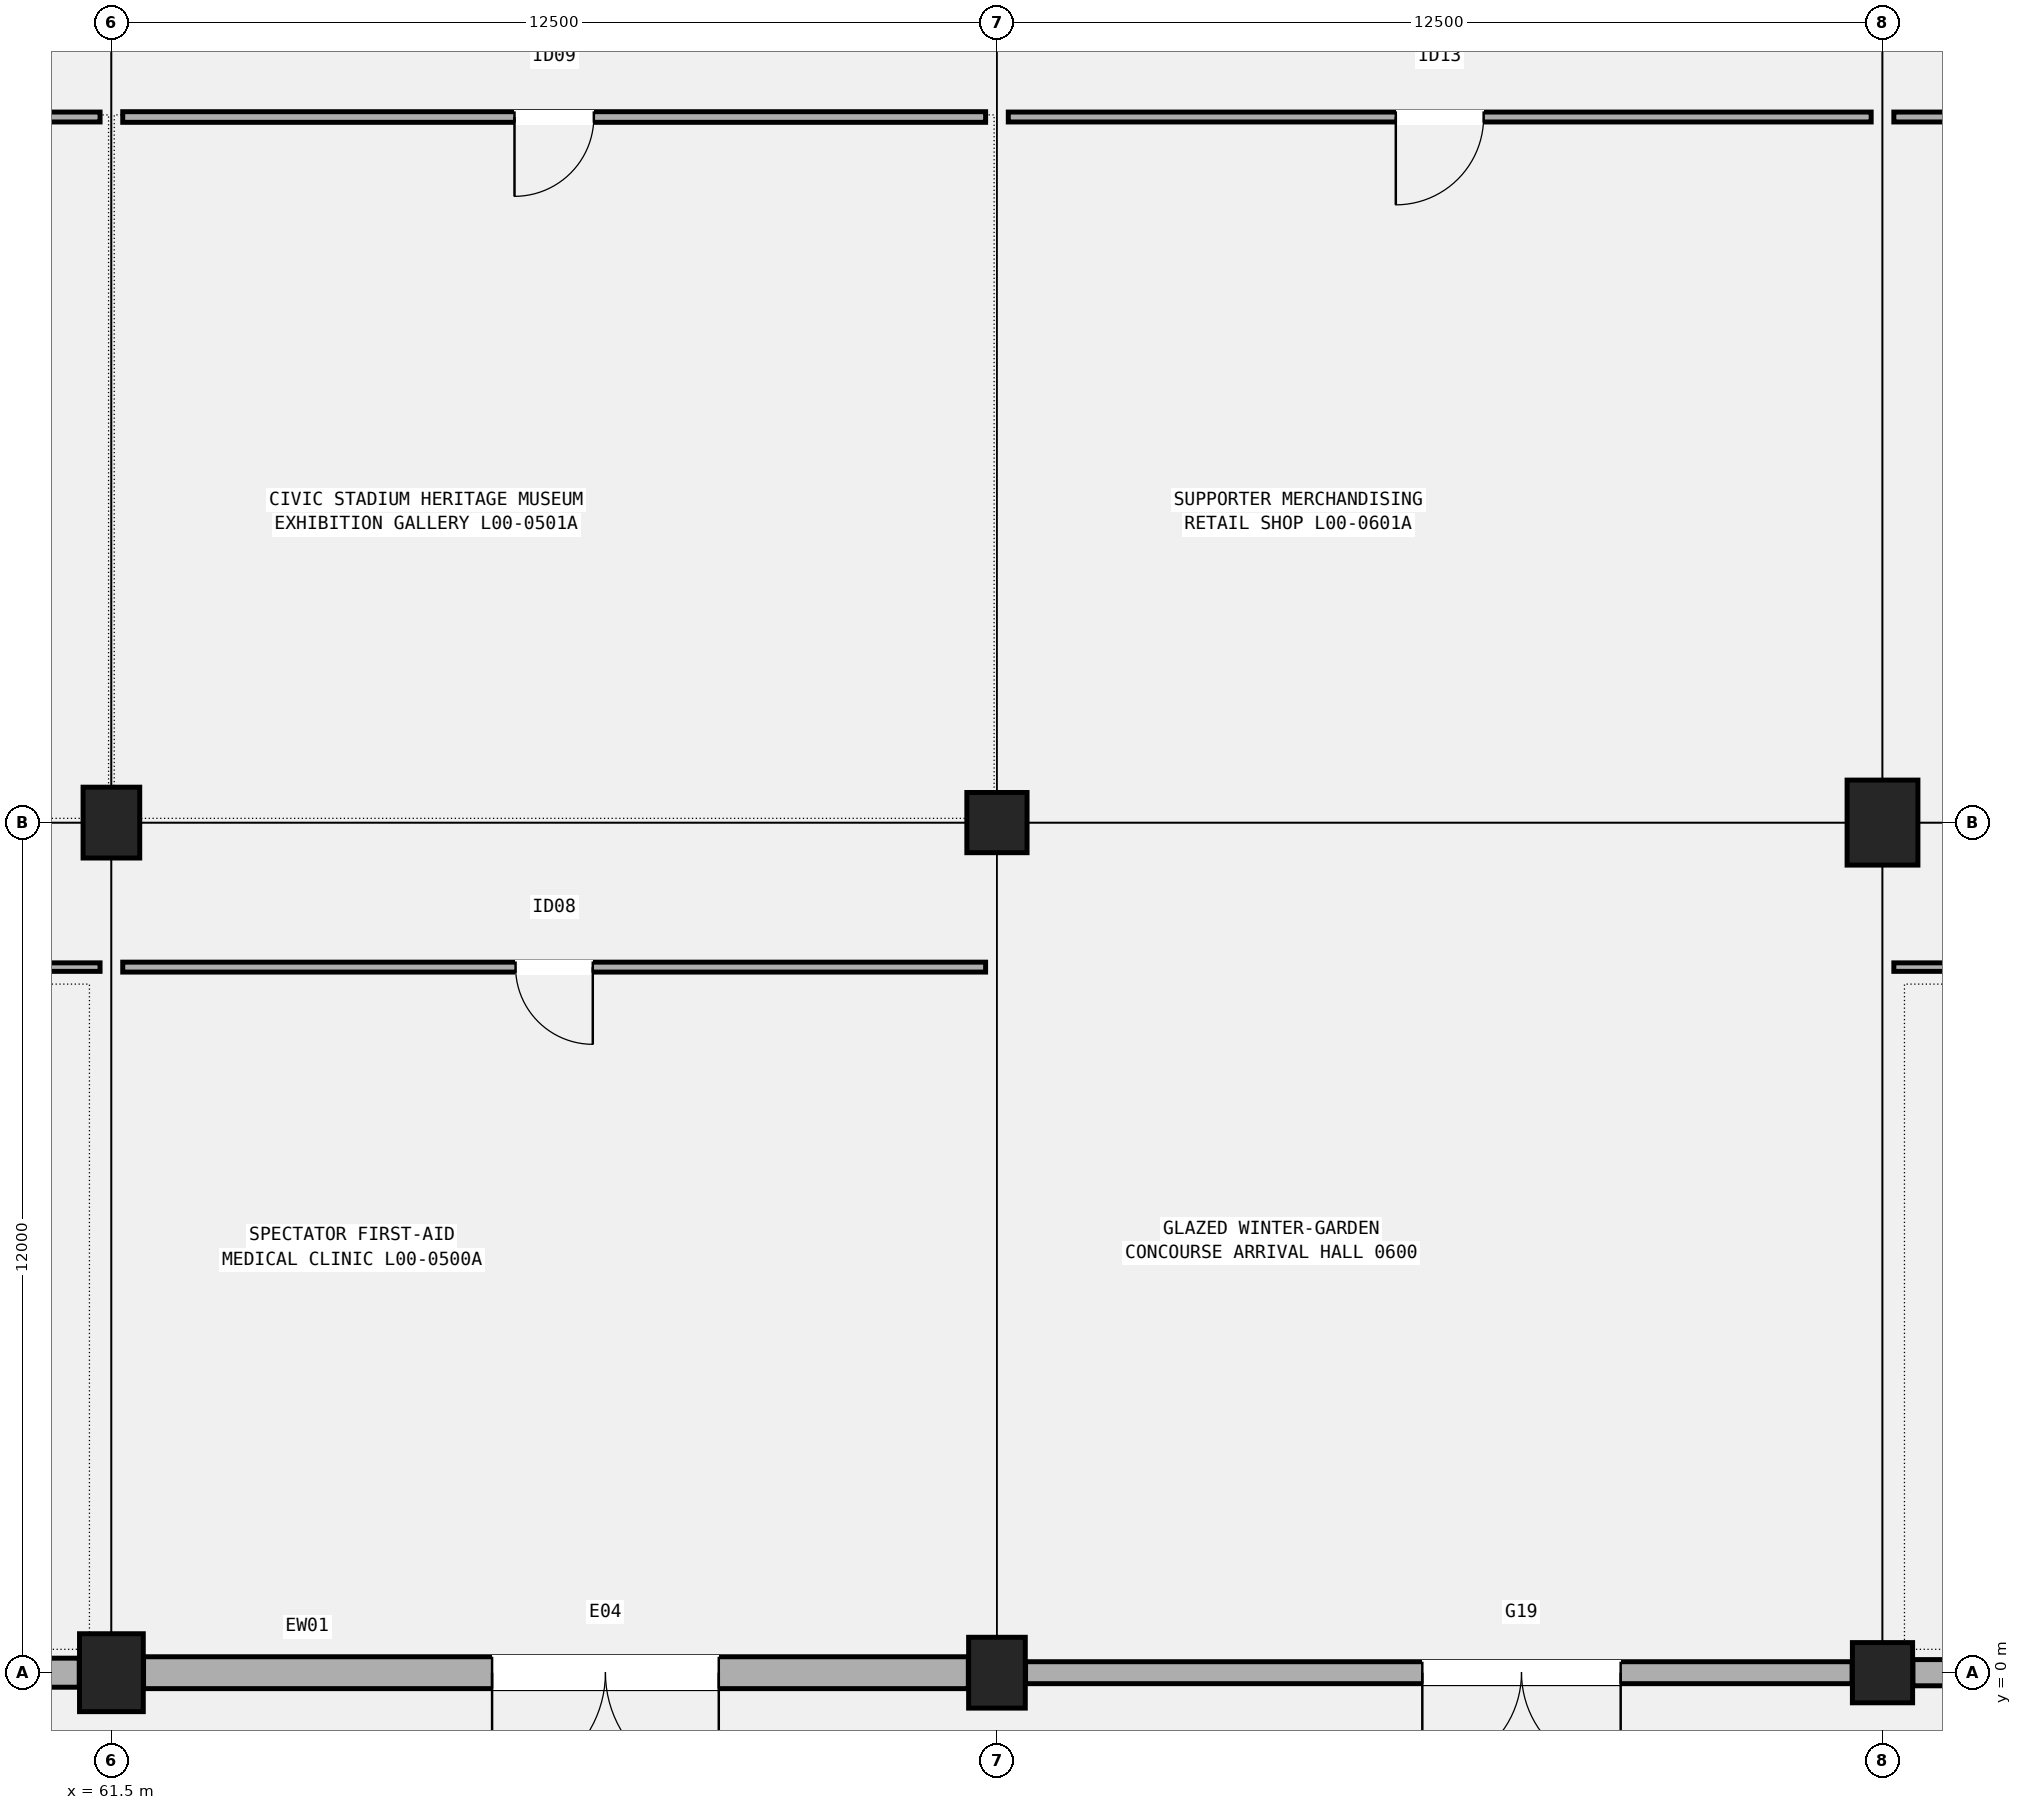
"""IFC4 building model, lengths in metres.
Left out: names, types, materials, properties, quantities, classifications, styles, units other than length and angle.
Written with IfcOpenShell. Run it as: python <this file> out.ifc"""

import sys

from ifc_helpers import new_model, si_unit, direction, frame, frame_2d, origin, origin_2d, place, context, subcontext, project, spatial, rectangle, circle, extrude, element, fill, save


model = new_model("IFC4")
c1 = context("Model", 3, precision=1e-05, world=origin(), true_north=direction((0.0, 1.0)))
c2 = subcontext(c1, "Body", "Model", "MODEL_VIEW")
j1 = project(units=[si_unit("LENGTHUNIT", "METRE"), si_unit("PLANEANGLEUNIT", "RADIAN")], contexts=[c1])
p1 = place(None, origin())
s1 = spatial("IfcSite", under=j1, at=p1, CompositionType="ELEMENT")
p2 = place(p1, origin())
s2 = spatial("IfcBuilding", under=s1, at=p2, CompositionType="ELEMENT")
p3 = place(p2, origin())
s3 = spatial("IfcBuildingStorey", under=s2, at=p3, CompositionType="ELEMENT", Elevation=0.0)
p4 = place(p3, frame((61.5, 0.0, 0.0), z_axis=(0.0, 0.0, 1.0), x_axis=(1.0, 0.0, 0.0)))
e1 = element("IfcColumn", 1, at=p4, inside=s3, PredefinedType="COLUMN", context=c2, shape_type="SweptSolid", body=[
    extrude(rectangle(XDim=0.9, YDim=1.1, at=origin_2d()), origin(), (0.0, 0.0, 1.0), 5.4),
])
for number, where, z_axis, x_axis in (
    (2, (61.5, 12.0, 0.0), (0.0, 0.0, 1.0), (1.0, 0.0, 0.0)),
    (3, (74.0, 0.0, 0.0), (0.0, 0.0, 1.0), (1.0, 0.0, 0.0)),
):
    element("IfcColumn", number, at=place(p3, frame(where, z_axis=z_axis, x_axis=x_axis)), inside=s3, PredefinedType="COLUMN", context=c2, shape_type="SweptSolid", body=[
        extrude(rectangle(XDim=0.8, YDim=1.0, at=origin_2d()), origin(), (0.0, 0.0, 1.0), 5.4),
    ])
for number, where, z_axis, x_axis in (
    (4, (74.0, 12.0, 0.0), (0.0, 0.0, 1.0), (1.0, 0.0, 0.0)),
    (5, (86.5, 0.0, 0.0), (0.0, 0.0, 1.0), (1.0, 0.0, 0.0)),
):
    element("IfcColumn", number, at=place(p3, frame(where, z_axis=z_axis, x_axis=x_axis)), inside=s3, PredefinedType="COLUMN", context=c2, shape_type="SweptSolid", body=[
        extrude(circle(Radius=0.425, at=origin_2d()), origin(), (0.0, 0.0, 1.0), 5.4),
    ])
p5 = place(p3, frame((86.5, 12.0, 0.0), z_axis=(0.0, 0.0, 1.0), x_axis=(1.0, 0.0, 0.0)))
e6 = element("IfcColumn", 6, at=p5, inside=s3, PredefinedType="COLUMN", context=c2, shape_type="SweptSolid", body=[
    extrude(rectangle(XDim=1.0, YDim=1.2, at=origin_2d()), origin(), (0.0, 0.0, 1.0), 5.4),
])
p6 = place(p3, frame((49.504, 0.0, 0.0), z_axis=(0.0, 0.0, 1.0), x_axis=(1.0, 0.0, 0.0)))
e7 = element("IfcWall", 7, at=p6, inside=s3, PredefinedType="SOLIDWALL", context=c2, shape_type="SweptSolid", body=[
    extrude(rectangle(XDim=11.542, YDim=0.41, at=frame_2d((5.771, 0.0))), origin(), (0.0, 0.0, 1.0), 4.09),
])
p7 = place(p6, frame((8.325, 0.0, 0.0), z_axis=(0.0, 0.0, 1.0), x_axis=(-1.0, 0.0, 0.0)))
e8 = element("IfcOpeningElement", 8, at=p7, cuts=e7, PredefinedType="OPENING", context=c2, shape_type="SweptSolid", body=[
    extrude(rectangle(XDim=2.8, YDim=2.4, at=frame_2d((1.4, 1.2))), frame((0.0, 0.215, 0.0), z_axis=(0.0, -1.0, 0.0), x_axis=(1.0, 0.0, 0.0)), (0.0, 0.0, 1.0), 0.43),
])
p8 = place(p3, frame((61.954, 0.0, 0.0), z_axis=(0.0, 0.0, 1.0), x_axis=(1.0, 0.0, 0.0)))
e9 = element("IfcWall", 9, at=p8, inside=s3, PredefinedType="SOLIDWALL", context=c2, shape_type="SweptSolid", body=[
    extrude(rectangle(XDim=11.642, YDim=0.45, at=frame_2d((5.821, 0.0))), origin(), (0.0, 0.0, 1.0), 4.24),
])
p9 = place(p8, frame((8.119, 0.0, 0.0), z_axis=(0.0, 0.0, 1.0), x_axis=(-1.0, 0.0, 0.0)))
e10 = element("IfcOpeningElement", 10, at=p9, cuts=e9, PredefinedType="OPENING", context=c2, shape_type="SweptSolid", body=[
    extrude(rectangle(XDim=3.2, YDim=2.6, at=frame_2d((1.6, 1.3))), frame((0.0, 0.235, 0.0), z_axis=(0.0, -1.0, 0.0), x_axis=(1.0, 0.0, 0.0)), (0.0, 0.0, 1.0), 0.47),
])
p10 = place(p3, frame((74.404, 0.0, 0.0), z_axis=(0.0, 0.0, 1.0), x_axis=(1.0, 0.0, 0.0)))
e11 = element("IfcWall", 11, at=p10, inside=s3, PredefinedType="SOLIDWALL", context=c2, shape_type="SweptSolid", body=[
    extrude(rectangle(XDim=11.667, YDim=0.31, at=frame_2d((5.833, 0.0))), origin(), (0.0, 0.0, 1.0), 4.24),
])
p11 = place(p10, frame((8.4, 0.0, 0.0), z_axis=(0.0, 0.0, 1.0), x_axis=(-1.0, 0.0, 0.0)))
e12 = element("IfcOpeningElement", 12, at=p11, cuts=e11, PredefinedType="OPENING", context=c2, shape_type="SweptSolid", body=[
    extrude(rectangle(XDim=2.8, YDim=2.4, at=frame_2d((1.4, 1.2))), frame((0.0, 0.165, 0.0), z_axis=(0.0, -1.0, 0.0), x_axis=(1.0, 0.0, 0.0)), (0.0, 0.0, 1.0), 0.33),
])
p12 = place(p3, frame((86.929, 0.0, 0.0), z_axis=(0.0, 0.0, 1.0), x_axis=(1.0, 0.0, 0.0)))
e13 = element("IfcWall", 13, at=p12, inside=s3, PredefinedType="SOLIDWALL", context=c2, shape_type="SweptSolid", body=[
    extrude(rectangle(XDim=11.567, YDim=0.37, at=frame_2d((5.784, 0.0))), origin(), (0.0, 0.0, 1.0), 4.34),
])
p13 = place(p12, frame((8.34, 0.0, 0.0), z_axis=(0.0, 0.0, 1.0), x_axis=(-1.0, 0.0, 0.0)))
e14 = element("IfcOpeningElement", 14, at=p13, cuts=e13, PredefinedType="OPENING", context=c2, shape_type="SweptSolid", body=[
    extrude(rectangle(XDim=2.8, YDim=2.4, at=frame_2d((1.4, 1.2))), frame((0.0, 0.195, 0.0), z_axis=(0.0, -1.0, 0.0), x_axis=(1.0, 0.0, 0.0)), (0.0, 0.0, 1.0), 0.39),
])
p14 = place(p3, frame((50.97, 9.96, 0.0), z_axis=(0.0, 0.0, 1.0), x_axis=(1.0, 0.0, 0.0)))
e15 = element("IfcWall", 15, at=p14, inside=s3, PredefinedType="PARTITIONING", context=c2, shape_type="SweptSolid", body=[
    extrude(rectangle(XDim=10.37, YDim=0.12, at=frame_2d((5.185, 0.0))), origin(), (0.0, 0.0, 1.0), 4.52),
])
p15 = place(p14, frame((5.635, 0.0, 0.0), z_axis=(0.0, 0.0, 1.0), x_axis=(-1.0, 0.0, 0.0)))
e16 = element("IfcOpeningElement", 16, at=p15, cuts=e15, PredefinedType="OPENING", context=c2, shape_type="SweptSolid", body=[
    extrude(rectangle(XDim=0.9, YDim=2.06, at=frame_2d((0.45, 1.03))), frame((0.0, 0.07, 0.0), z_axis=(0.0, -1.0, 0.0), x_axis=(1.0, 0.0, 0.0)), (0.0, 0.0, 1.0), 0.14),
])
p16 = place(p3, frame((50.97, 21.96, 0.0), z_axis=(0.0, 0.0, 1.0), x_axis=(1.0, 0.0, 0.0)))
e17 = element("IfcWall", 17, at=p16, inside=s3, PredefinedType="PARTITIONING", context=c2, shape_type="SweptSolid", body=[
    extrude(rectangle(XDim=10.37, YDim=0.14, at=frame_2d((5.185, 0.0))), origin(), (0.0, 0.0, 1.0), 4.52),
])
p17 = place(p16, frame((2.935, 0.0, 0.0), z_axis=(0.0, 0.0, 1.0), x_axis=(-1.0, 0.0, 0.0)))
e18 = element("IfcOpeningElement", 18, at=p17, cuts=e17, PredefinedType="OPENING", context=c2, shape_type="SweptSolid", body=[
    extrude(rectangle(XDim=0.92, YDim=2.1, at=frame_2d((0.46, 1.05))), frame((0.0, 0.08, 0.0), z_axis=(0.0, -1.0, 0.0), x_axis=(1.0, 0.0, 0.0)), (0.0, 0.0, 1.0), 0.16),
])
p18 = place(p16, frame((8.215, 0.0, 0.0), z_axis=(0.0, 0.0, 1.0), x_axis=(-1.0, 0.0, 0.0)))
e19 = element("IfcOpeningElement", 19, at=p18, cuts=e17, PredefinedType="OPENING", context=c2, shape_type="SweptSolid", body=[
    extrude(rectangle(XDim=0.95, YDim=2.12, at=frame_2d((0.475, 1.06))), frame((0.0, 0.08, 0.0), z_axis=(0.0, -1.0, 0.0), x_axis=(1.0, 0.0, 0.0)), (0.0, 0.0, 1.0), 0.16),
])
p19 = place(p3, frame((61.66, 9.96, 0.0), z_axis=(0.0, 0.0, 1.0), x_axis=(1.0, 0.0, 0.0)))
e20 = element("IfcWall", 20, at=p19, inside=s3, PredefinedType="PARTITIONING", context=c2, shape_type="SweptSolid", body=[
    extrude(rectangle(XDim=12.18, YDim=0.14, at=frame_2d((6.09, 0.0))), origin(), (0.0, 0.0, 1.0), 4.52),
])
p20 = place(p19, frame((6.635, 0.0, 0.0), z_axis=(0.0, 0.0, 1.0), x_axis=(-1.0, 0.0, 0.0)))
e21 = element("IfcOpeningElement", 21, at=p20, cuts=e20, PredefinedType="OPENING", context=c2, shape_type="SweptSolid", body=[
    extrude(rectangle(XDim=1.09, YDim=2.16, at=frame_2d((0.545, 1.08))), frame((0.0, 0.08, 0.0), z_axis=(0.0, -1.0, 0.0), x_axis=(1.0, 0.0, 0.0)), (0.0, 0.0, 1.0), 0.16),
])
p21 = place(p3, frame((61.66, 21.96, 0.0), z_axis=(0.0, 0.0, 1.0), x_axis=(1.0, 0.0, 0.0)))
e22 = element("IfcWall", 22, at=p21, inside=s3, PredefinedType="PARTITIONING", context=c2, shape_type="SweptSolid", body=[
    extrude(rectangle(XDim=12.18, YDim=0.15, at=frame_2d((6.09, 0.0))), origin(), (0.0, 0.0, 1.0), 4.52),
])
p22 = place(p21, frame((6.65, 0.0, 0.0), z_axis=(0.0, 0.0, 1.0), x_axis=(-1.0, 0.0, 0.0)))
e23 = element("IfcOpeningElement", 23, at=p22, cuts=e22, PredefinedType="OPENING", context=c2, shape_type="SweptSolid", body=[
    extrude(rectangle(XDim=1.12, YDim=2.18, at=frame_2d((0.56, 1.09))), frame((0.0, 0.085, 0.0), z_axis=(0.0, -1.0, 0.0), x_axis=(1.0, 0.0, 0.0)), (0.0, 0.0, 1.0), 0.17),
])
p23 = place(p3, frame((74.16, 21.96, 0.0), z_axis=(0.0, 0.0, 1.0), x_axis=(1.0, 0.0, 0.0)))
e24 = element("IfcWall", 24, at=p23, inside=s3, PredefinedType="PARTITIONING", context=c2, shape_type="SweptSolid", body=[
    extrude(rectangle(XDim=12.18, YDim=0.14, at=frame_2d((6.09, 0.0))), origin(), (0.0, 0.0, 1.0), 4.52),
])
p24 = place(p23, frame((6.71, 0.0, 0.0), z_axis=(0.0, 0.0, 1.0), x_axis=(-1.0, 0.0, 0.0)))
e25 = element("IfcOpeningElement", 25, at=p24, cuts=e24, PredefinedType="OPENING", context=c2, shape_type="SweptSolid", body=[
    extrude(rectangle(XDim=1.24, YDim=2.22, at=frame_2d((0.62, 1.11))), frame((0.0, 0.08, 0.0), z_axis=(0.0, -1.0, 0.0), x_axis=(1.0, 0.0, 0.0)), (0.0, 0.0, 1.0), 0.16),
])
p25 = place(p3, frame((86.66, 9.96, 0.0), z_axis=(0.0, 0.0, 1.0), x_axis=(1.0, 0.0, 0.0)))
e26 = element("IfcWall", 26, at=p25, inside=s3, PredefinedType="PARTITIONING", context=c2, shape_type="SweptSolid", body=[
    extrude(rectangle(XDim=12.168, YDim=0.12, at=frame_2d((6.084, 0.0))), origin(), (0.0, 0.0, 1.0), 4.52),
])
p26 = place(p25, frame((6.77, 0.0, 0.0), z_axis=(0.0, 0.0, 1.0), x_axis=(-1.0, 0.0, 0.0)))
e27 = element("IfcOpeningElement", 27, at=p26, cuts=e26, PredefinedType="OPENING", context=c2, shape_type="SweptSolid", body=[
    extrude(rectangle(XDim=1.36, YDim=2.25, at=frame_2d((0.68, 1.125))), frame((0.0, 0.07, 0.0), z_axis=(0.0, -1.0, 0.0), x_axis=(1.0, 0.0, 0.0)), (0.0, 0.0, 1.0), 0.14),
])
p27 = place(p3, frame((86.66, 21.96, 0.0), z_axis=(0.0, 0.0, 1.0), x_axis=(1.0, 0.0, 0.0)))
e28 = element("IfcWall", 28, at=p27, inside=s3, PredefinedType="PARTITIONING", context=c2, shape_type="SweptSolid", body=[
    extrude(rectangle(XDim=12.18, YDim=0.14, at=frame_2d((6.09, 0.0))), origin(), (0.0, 0.0, 1.0), 4.52),
])
p28 = place(p27, frame((3.918, 0.0, 0.0), z_axis=(0.0, 0.0, 1.0), x_axis=(-1.0, 0.0, 0.0)))
e29 = element("IfcOpeningElement", 29, at=p28, cuts=e28, PredefinedType="OPENING", context=c2, shape_type="SweptSolid", body=[
    extrude(rectangle(XDim=1.4, YDim=2.24, at=frame_2d((0.7, 1.12))), frame((0.0, 0.08, 0.0), z_axis=(0.0, -1.0, 0.0), x_axis=(1.0, 0.0, 0.0)), (0.0, 0.0, 1.0), 0.16),
])
p29 = place(p27, frame((10.108, 0.0, 0.0), z_axis=(0.0, 0.0, 1.0), x_axis=(-1.0, 0.0, 0.0)))
e30 = element("IfcOpeningElement", 30, at=p29, cuts=e28, PredefinedType="OPENING", context=c2, shape_type="SweptSolid", body=[
    extrude(rectangle(XDim=1.44, YDim=2.26, at=frame_2d((0.72, 1.13))), frame((0.0, 0.08, 0.0), z_axis=(0.0, -1.0, 0.0), x_axis=(1.0, 0.0, 0.0)), (0.0, 0.0, 1.0), 0.16),
])
p30 = place(p9, origin())
e31 = element("IfcDoor", 31, at=p30, inside=s3, OperationType="DOUBLE_DOOR_SINGLE_SWING", PredefinedType="DOOR", context=c2, shape_type="SweptSolid", body=[
    extrude(rectangle(XDim=3.2, YDim=2.6, at=frame_2d((1.6, 1.3))), frame((0.0, 0.025, 0.0), z_axis=(0.0, -1.0, 0.0), x_axis=(1.0, 0.0, 0.0)), (0.0, 0.0, 1.0), 0.05),
])
fill(e10, e31)
p31 = place(p11, origin())
e32 = element("IfcDoor", 32, at=p31, inside=s3, OperationType="DOUBLE_DOOR_SINGLE_SWING", PredefinedType="DOOR", context=c2, shape_type="SweptSolid", body=[
    extrude(rectangle(XDim=2.8, YDim=2.4, at=frame_2d((1.4, 1.2))), frame((0.0, 0.025, 0.0), z_axis=(0.0, -1.0, 0.0), x_axis=(1.0, 0.0, 0.0)), (0.0, 0.0, 1.0), 0.05),
])
fill(e12, e32)
p32 = place(p20, origin())
e33 = element("IfcDoor", 33, at=p32, inside=s3, OperationType="SINGLE_SWING_LEFT", PredefinedType="DOOR", context=c2, shape_type="SweptSolid", body=[
    extrude(rectangle(XDim=1.09, YDim=2.16, at=frame_2d((0.545, 1.08))), frame((0.0, 0.025, 0.0), z_axis=(0.0, -1.0, 0.0), x_axis=(1.0, 0.0, 0.0)), (0.0, 0.0, 1.0), 0.05),
])
fill(e21, e33)
p33 = place(p22, origin())
e34 = element("IfcDoor", 34, at=p33, inside=s3, OperationType="SINGLE_SWING_RIGHT", PredefinedType="DOOR", context=c2, shape_type="SweptSolid", body=[
    extrude(rectangle(XDim=1.12, YDim=2.18, at=frame_2d((0.56, 1.09))), frame((0.0, 0.025, 0.0), z_axis=(0.0, -1.0, 0.0), x_axis=(1.0, 0.0, 0.0)), (0.0, 0.0, 1.0), 0.05),
])
fill(e23, e34)
p34 = place(p24, origin())
e35 = element("IfcDoor", 35, at=p34, inside=s3, OperationType="SINGLE_SWING_RIGHT", PredefinedType="DOOR", context=c2, shape_type="SweptSolid", body=[
    extrude(rectangle(XDim=1.24, YDim=2.22, at=frame_2d((0.62, 1.11))), frame((0.0, 0.025, 0.0), z_axis=(0.0, -1.0, 0.0), x_axis=(1.0, 0.0, 0.0)), (0.0, 0.0, 1.0), 0.05),
])
fill(e25, e35)
save(model, sys.argv[1])
